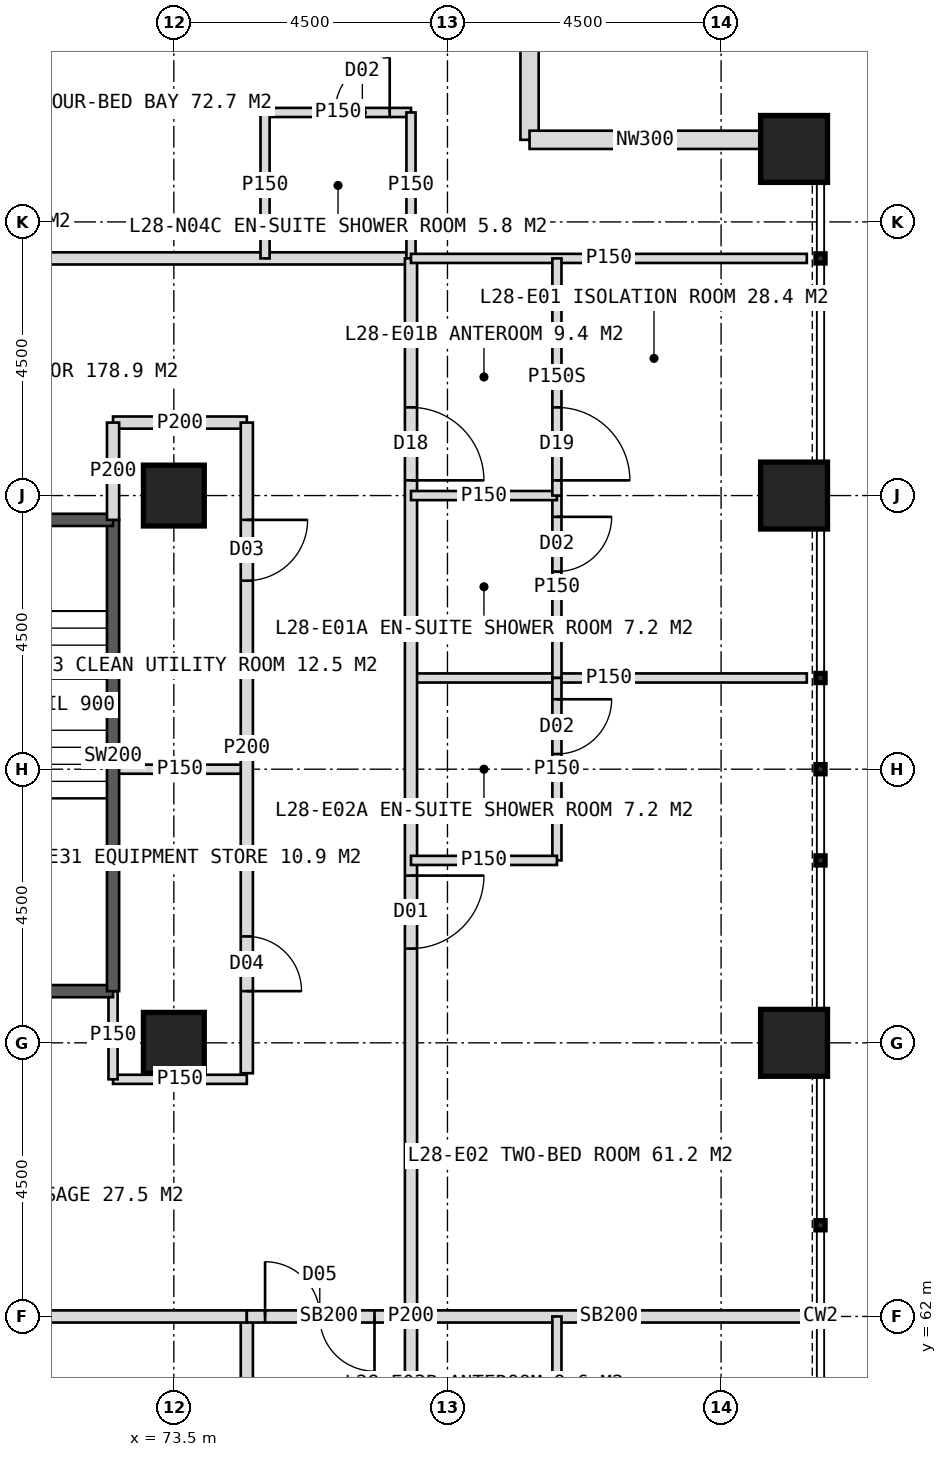
"""IFC4 building model, lengths in metres.
Left out: names, types, materials, properties, quantities, classifications, styles, units other than length and angle.
Written with IfcOpenShell. Run it as: python <this file> out.ifc"""

import sys

from ifc_helpers import new_model, si_unit, direction, frame, frame_2d, origin, origin_2d, place, context, subcontext, project, spatial, rectangle, hollow_rectangle, extrude, element, fill, save


model = new_model("IFC4")
c1 = context("Model", 3, precision=1e-05, world=origin(), true_north=direction((0.0, 1.0)))
c2 = subcontext(c1, "Body", "Model", "MODEL_VIEW")
j1 = project(units=[si_unit("LENGTHUNIT", "METRE"), si_unit("PLANEANGLEUNIT", "RADIAN")], contexts=[c1])
p1 = place(None, origin())
s1 = spatial("IfcSite", under=j1, at=p1, CompositionType="ELEMENT")
p2 = place(p1, origin())
s2 = spatial("IfcBuilding", under=s1, at=p2, CompositionType="ELEMENT")
p3 = place(p2, frame((0.0, 0.0, 120.0)))
s3 = spatial("IfcBuildingStorey", under=s2, at=p3, CompositionType="ELEMENT", Elevation=120.0)
for number, where, z_axis, x_axis in (
    (1, (73.5, 75.5, 0.0), (0.0, 0.0, 1.0), (1.0, 0.0, 0.0)),
    (2, (73.5, 66.5, 0.0), (0.0, 0.0, 1.0), (1.0, 0.0, 0.0)),
):
    element("IfcColumn", number, at=place(p3, frame(where, z_axis=z_axis, x_axis=x_axis)), inside=s3, PredefinedType="COLUMN", context=c2, shape_type="SweptSolid", body=[
        extrude(hollow_rectangle(XDim=1.0, YDim=1.0, WallThickness=0.1, at=origin_2d()), origin(), (0.0, 0.0, 1.0), 4.0),
    ])
for number, where, z_axis, x_axis in (
    (3, (83.7, 66.5, 0.0), (0.0, 0.0, 1.0), (1.0, 0.0, 0.0)),
    (4, (83.7, 75.5, 0.0), (0.0, 0.0, 1.0), (1.0, 0.0, 0.0)),
    (5, (83.7, 81.2, 0.0), (0.0, 0.0, 1.0), (1.0, 0.0, 0.0)),
):
    element("IfcColumn", number, at=place(p3, frame(where, z_axis=z_axis, x_axis=x_axis)), inside=s3, PredefinedType="COLUMN", context=c2, shape_type="SweptSolid", body=[
        extrude(hollow_rectangle(XDim=1.1, YDim=1.1, WallThickness=0.1, at=origin_2d()), origin(), (0.0, 0.0, 1.0), 4.0),
    ])
for number, where, z_axis, x_axis in (
    (6, (79.35, 85.15, 0.0), (0.0, 0.0, 1.0), (0.0, -1.0, 0.0)),
    (7, (79.35, 81.35, 0.0), (0.0, 0.0, 1.0), (1.0, 0.0, 0.0)),
):
    element("IfcWall", number, at=place(p3, frame(where, z_axis=z_axis, x_axis=x_axis)), inside=s3, PredefinedType="ELEMENTEDWALL", context=c2, shape_type="SweptSolid", body=[
        extrude(rectangle(XDim=3.8, YDim=0.3, at=frame_2d((1.9, 0.0))), origin(), (0.0, 0.0, 1.0), 4.0),
    ])
p4 = place(p3, frame((42.6, 79.4, 0.0), z_axis=(0.0, 0.0, 1.0), x_axis=(1.0, 0.0, 0.0)))
e8 = element("IfcWall", 8, at=p4, inside=s3, PredefinedType="PARTITIONING", context=c2, shape_type="SweptSolid", body=[
    extrude(rectangle(XDim=34.8, YDim=0.2, at=frame_2d((17.4, 0.0))), origin(), (0.0, 0.0, 1.0), 3.75),
])
p5 = place(p4, frame((2.45, 0.0, 0.0)))
e9 = element("IfcOpeningElement", 9, at=p5, cuts=e8, PredefinedType="OPENING", context=c2, shape_type="SweptSolid", body=[
    extrude(rectangle(XDim=1.2, YDim=2.2, at=frame_2d((0.6, 1.1))), frame((0.0, 0.11, 0.0), z_axis=(0.0, -1.0, 0.0), x_axis=(1.0, 0.0, 0.0)), (0.0, 0.0, 1.0), 0.22),
])
p6 = place(p4, frame((10.15, 0.0, 0.0)))
e10 = element("IfcOpeningElement", 10, at=p6, cuts=e8, PredefinedType="OPENING", context=c2, shape_type="SweptSolid", body=[
    extrude(rectangle(XDim=1.2, YDim=2.2, at=frame_2d((0.6, 1.1))), frame((0.0, 0.11, 0.0), z_axis=(0.0, -1.0, 0.0), x_axis=(1.0, 0.0, 0.0)), (0.0, 0.0, 1.0), 0.22),
])
p7 = place(p4, frame((19.8, 0.0, 0.0)))
e11 = element("IfcOpeningElement", 11, at=p7, cuts=e8, PredefinedType="OPENING", context=c2, shape_type="SweptSolid", body=[
    extrude(rectangle(XDim=1.2, YDim=2.2, at=frame_2d((0.6, 1.1))), frame((0.0, 0.11, 0.0), z_axis=(0.0, -1.0, 0.0), x_axis=(1.0, 0.0, 0.0)), (0.0, 0.0, 1.0), 0.22),
])
p8 = place(p4, frame((27.55, 0.0, 0.0)))
e12 = element("IfcOpeningElement", 12, at=p8, cuts=e8, PredefinedType="OPENING", context=c2, shape_type="SweptSolid", body=[
    extrude(rectangle(XDim=1.2, YDim=2.2, at=frame_2d((0.6, 1.1))), frame((0.0, 0.11, 0.0), z_axis=(0.0, -1.0, 0.0), x_axis=(1.0, 0.0, 0.0)), (0.0, 0.0, 1.0), 0.22),
])
p9 = place(p3, frame((75.0, 81.8, 0.0), z_axis=(0.0, 0.0, 1.0), x_axis=(1.0, 0.0, 0.0)))
e13 = element("IfcWall", 13, at=p9, inside=s3, PredefinedType="PARTITIONING", context=c2, shape_type="SweptSolid", body=[
    extrude(rectangle(XDim=2.4, YDim=0.15, at=frame_2d((1.2, 0.0))), origin(), (0.0, 0.0, 1.0), 3.75),
])
p10 = place(p9, frame((1.15, 0.0, 0.0)))
e14 = element("IfcOpeningElement", 14, at=p10, cuts=e13, PredefinedType="OPENING", context=c2, shape_type="SweptSolid", body=[
    extrude(rectangle(XDim=0.9, YDim=2.1, at=frame_2d((0.45, 1.05))), frame((0.0, 0.085, 0.0), z_axis=(0.0, -1.0, 0.0), x_axis=(1.0, 0.0, 0.0)), (0.0, 0.0, 1.0), 0.17),
])
for number, where, z_axis, x_axis in (
    (15, (75.0, 79.4, 0.0), (0.0, 0.0, 1.0), (0.0, 1.0, 0.0)),
    (16, (77.4, 79.4, 0.0), (0.0, 0.0, 1.0), (0.0, 1.0, 0.0)),
):
    element("IfcWall", number, at=place(p3, frame(where, z_axis=z_axis, x_axis=x_axis)), inside=s3, PredefinedType="PARTITIONING", context=c2, shape_type="SweptSolid", body=[
        extrude(rectangle(XDim=2.4, YDim=0.15, at=frame_2d((1.2, 0.0))), origin(), (0.0, 0.0, 1.0), 3.75),
    ])
p11 = place(p3, frame((72.5, 76.7, 0.0), z_axis=(0.0, 0.0, 1.0), x_axis=(1.0, 0.0, 0.0)))
e17 = element("IfcWall", 17, at=p11, inside=s3, PredefinedType="PARTITIONING", context=c2, shape_type="SweptSolid", body=[
    extrude(rectangle(XDim=2.2, YDim=0.2, at=frame_2d((1.1, 0.0))), origin(), (0.0, 0.0, 1.0), 3.75),
])
p12 = place(p3, frame((77.4, 72.5, 0.0), z_axis=(0.0, 0.0, 1.0), x_axis=(1.0, 0.0, 0.0)))
e18 = element("IfcWall", 18, at=p12, inside=s3, PredefinedType="PARTITIONING", context=c2, shape_type="SweptSolid", body=[
    extrude(rectangle(XDim=6.51, YDim=0.15, at=frame_2d((3.255, 0.0))), origin(), (0.0, 0.0, 1.0), 3.75),
])
p13 = place(p3, frame((77.4, 62.0, 0.0), z_axis=(0.0, 0.0, 1.0), x_axis=(1.0, 0.0, 0.0)))
e19 = element("IfcWall", 19, at=p13, inside=s3, PredefinedType="SOLIDWALL", context=c2, shape_type="SweptSolid", body=[
    extrude(rectangle(XDim=6.51, YDim=0.2, at=frame_2d((3.255, 0.0))), origin(), (0.0, 0.0, 1.0), 2.95),
])
p14 = place(p3, frame((77.4, 79.4, 0.0), z_axis=(0.0, 0.0, 1.0), x_axis=(0.0, -1.0, 0.0)))
e20 = element("IfcWall", 20, at=p14, inside=s3, PredefinedType="PARTITIONING", context=c2, shape_type="SweptSolid", body=[
    extrude(rectangle(XDim=34.8, YDim=0.2, at=frame_2d((17.4, 0.0))), origin(), (0.0, 0.0, 1.0), 3.75),
])
p15 = place(p14, frame((2.45, 0.0, 0.0)))
e21 = element("IfcOpeningElement", 21, at=p15, cuts=e20, PredefinedType="OPENING", context=c2, shape_type="SweptSolid", body=[
    extrude(rectangle(XDim=1.2, YDim=2.2, at=frame_2d((0.6, 1.1))), frame((0.0, 0.11, 0.0), z_axis=(0.0, -1.0, 0.0), x_axis=(1.0, 0.0, 0.0)), (0.0, 0.0, 1.0), 0.22),
])
p16 = place(p14, frame((10.15, 0.0, 0.0)))
e22 = element("IfcOpeningElement", 22, at=p16, cuts=e20, PredefinedType="OPENING", context=c2, shape_type="SweptSolid", body=[
    extrude(rectangle(XDim=1.2, YDim=2.2, at=frame_2d((0.6, 1.1))), frame((0.0, 0.11, 0.0), z_axis=(0.0, -1.0, 0.0), x_axis=(1.0, 0.0, 0.0)), (0.0, 0.0, 1.0), 0.22),
])
p17 = place(p14, frame((19.55, 0.0, 0.0)))
e23 = element("IfcOpeningElement", 23, at=p17, cuts=e20, PredefinedType="OPENING", context=c2, shape_type="SweptSolid", body=[
    extrude(rectangle(XDim=1.2, YDim=2.2, at=frame_2d((0.6, 1.1))), frame((0.0, 0.11, 0.0), z_axis=(0.0, -1.0, 0.0), x_axis=(1.0, 0.0, 0.0)), (0.0, 0.0, 1.0), 0.22),
])
p18 = place(p14, frame((26.05, 0.0, 0.0)))
e24 = element("IfcOpeningElement", 24, at=p18, cuts=e20, PredefinedType="OPENING", context=c2, shape_type="SweptSolid", body=[
    extrude(rectangle(XDim=1.2, YDim=2.2, at=frame_2d((0.6, 1.1))), frame((0.0, 0.11, 0.0), z_axis=(0.0, -1.0, 0.0), x_axis=(1.0, 0.0, 0.0)), (0.0, 0.0, 1.0), 0.22),
])
p19 = place(p3, frame((77.4, 79.4, 0.0), z_axis=(0.0, 0.0, 1.0), x_axis=(1.0, 0.0, 0.0)))
e25 = element("IfcWall", 25, at=p19, inside=s3, PredefinedType="PARTITIONING", context=c2, shape_type="SweptSolid", body=[
    extrude(rectangle(XDim=6.51, YDim=0.15, at=frame_2d((3.255, 0.0))), origin(), (0.0, 0.0, 1.0), 3.75),
])
p20 = place(p3, frame((79.8, 75.5, 0.0), z_axis=(0.0, 0.0, 1.0), x_axis=(0.0, -1.0, 0.0)))
e26 = element("IfcWall", 26, at=p20, inside=s3, PredefinedType="PARTITIONING", context=c2, shape_type="SweptSolid", body=[
    extrude(rectangle(XDim=3.0, YDim=0.15, at=frame_2d((1.5, 0.0))), origin(), (0.0, 0.0, 1.0), 3.75),
])
p21 = place(p20, frame((0.35, 0.0, 0.0)))
e27 = element("IfcOpeningElement", 27, at=p21, cuts=e26, PredefinedType="OPENING", context=c2, shape_type="SweptSolid", body=[
    extrude(rectangle(XDim=0.9, YDim=2.1, at=frame_2d((0.45, 1.05))), frame((0.0, 0.085, 0.0), z_axis=(0.0, -1.0, 0.0), x_axis=(1.0, 0.0, 0.0)), (0.0, 0.0, 1.0), 0.17),
])
p22 = place(p3, frame((77.4, 75.5, 0.0), z_axis=(0.0, 0.0, 1.0), x_axis=(1.0, 0.0, 0.0)))
e28 = element("IfcWall", 28, at=p22, inside=s3, PredefinedType="PARTITIONING", context=c2, shape_type="SweptSolid", body=[
    extrude(rectangle(XDim=2.4, YDim=0.15, at=frame_2d((1.2, 0.0))), origin(), (0.0, 0.0, 1.0), 2.95),
])
p23 = place(p3, frame((79.8, 79.4, 0.0), z_axis=(0.0, 0.0, 1.0), x_axis=(0.0, -1.0, 0.0)))
e29 = element("IfcWall", 29, at=p23, inside=s3, PredefinedType="PARTITIONING", context=c2, shape_type="SweptSolid", body=[
    extrude(rectangle(XDim=3.9, YDim=0.15, at=frame_2d((1.95, 0.0))), origin(), (0.0, 0.0, 1.0), 3.75),
])
p24 = place(p23, frame((2.45, 0.0, 0.0)))
e30 = element("IfcOpeningElement", 30, at=p24, cuts=e29, PredefinedType="OPENING", context=c2, shape_type="SweptSolid", body=[
    extrude(rectangle(XDim=1.2, YDim=2.2, at=frame_2d((0.6, 1.1))), frame((0.0, 0.085, 0.0), z_axis=(0.0, -1.0, 0.0), x_axis=(1.0, 0.0, 0.0)), (0.0, 0.0, 1.0), 0.17),
])
p25 = place(p3, frame((79.8, 72.5, 0.0), z_axis=(0.0, 0.0, 1.0), x_axis=(0.0, -1.0, 0.0)))
e31 = element("IfcWall", 31, at=p25, inside=s3, PredefinedType="PARTITIONING", context=c2, shape_type="SweptSolid", body=[
    extrude(rectangle(XDim=3.0, YDim=0.15, at=frame_2d((1.5, 0.0))), origin(), (0.0, 0.0, 1.0), 3.75),
])
p26 = place(p25, frame((0.35, 0.0, 0.0)))
e32 = element("IfcOpeningElement", 32, at=p26, cuts=e31, PredefinedType="OPENING", context=c2, shape_type="SweptSolid", body=[
    extrude(rectangle(XDim=0.9, YDim=2.1, at=frame_2d((0.45, 1.05))), frame((0.0, 0.085, 0.0), z_axis=(0.0, -1.0, 0.0), x_axis=(1.0, 0.0, 0.0)), (0.0, 0.0, 1.0), 0.17),
])
p27 = place(p3, frame((77.4, 69.5, 0.0), z_axis=(0.0, 0.0, 1.0), x_axis=(1.0, 0.0, 0.0)))
e33 = element("IfcWall", 33, at=p27, inside=s3, PredefinedType="PARTITIONING", context=c2, shape_type="SweptSolid", body=[
    extrude(rectangle(XDim=2.4, YDim=0.15, at=frame_2d((1.2, 0.0))), origin(), (0.0, 0.0, 1.0), 3.75),
])
p28 = place(p3, frame((79.8, 62.0, 0.0), z_axis=(0.0, 0.0, 1.0), x_axis=(0.0, -1.0, 0.0)))
e34 = element("IfcWall", 34, at=p28, inside=s3, PredefinedType="PARTITIONING", context=c2, shape_type="SweptSolid", body=[
    extrude(rectangle(XDim=3.6, YDim=0.15, at=frame_2d((1.8, 0.0))), origin(), (0.0, 0.0, 1.0), 3.75),
])
p29 = place(p28, frame((2.15, 0.0, 0.0)))
e35 = element("IfcOpeningElement", 35, at=p29, cuts=e34, PredefinedType="OPENING", context=c2, shape_type="SweptSolid", body=[
    extrude(rectangle(XDim=1.2, YDim=2.2, at=frame_2d((0.6, 1.1))), frame((0.0, 0.085, 0.0), z_axis=(0.0, -1.0, 0.0), x_axis=(1.0, 0.0, 0.0)), (0.0, 0.0, 1.0), 0.17),
])
p30 = place(p3, frame((72.5, 71.0, 0.0), z_axis=(0.0, 0.0, 1.0), x_axis=(1.0, 0.0, 0.0)))
e36 = element("IfcWall", 36, at=p30, inside=s3, PredefinedType="PARTITIONING", context=c2, shape_type="SweptSolid", body=[
    extrude(rectangle(XDim=2.2, YDim=0.15, at=frame_2d((1.1, 0.0))), origin(), (0.0, 0.0, 1.0), 3.75),
])
p31 = place(p3, frame((74.7, 76.7, 0.0), z_axis=(0.0, 0.0, 1.0), x_axis=(0.0, -1.0, 0.0)))
e37 = element("IfcWall", 37, at=p31, inside=s3, PredefinedType="PARTITIONING", context=c2, shape_type="SweptSolid", body=[
    extrude(rectangle(XDim=10.7, YDim=0.2, at=frame_2d((5.35, 0.0))), origin(), (0.0, 0.0, 1.0), 3.75),
])
p32 = place(p31, frame((1.6, 0.0, 0.0)))
e38 = element("IfcOpeningElement", 38, at=p32, cuts=e37, PredefinedType="OPENING", context=c2, shape_type="SweptSolid", body=[
    extrude(rectangle(XDim=1.0, YDim=2.1, at=frame_2d((0.5, 1.05))), frame((0.0, 0.11, 0.0), z_axis=(0.0, -1.0, 0.0), x_axis=(1.0, 0.0, 0.0)), (0.0, 0.0, 1.0), 0.22),
])
p33 = place(p31, frame((8.45, 0.0, 0.0)))
e39 = element("IfcOpeningElement", 39, at=p33, cuts=e37, PredefinedType="OPENING", context=c2, shape_type="SweptSolid", body=[
    extrude(rectangle(XDim=0.9, YDim=2.1, at=frame_2d((0.45, 1.05))), frame((0.0, 0.11, 0.0), z_axis=(0.0, -1.0, 0.0), x_axis=(1.0, 0.0, 0.0)), (0.0, 0.0, 1.0), 0.22),
])
p34 = place(p3, frame((74.7, 62.0, 0.0), z_axis=(0.0, 0.0, 1.0), x_axis=(0.0, -1.0, 0.0)))
e40 = element("IfcWall", 40, at=p34, inside=s3, PredefinedType="PARTITIONING", context=c2, shape_type="SweptSolid", body=[
    extrude(rectangle(XDim=14.7, YDim=0.2, at=frame_2d((7.35, 0.0))), origin(), (0.0, 0.0, 1.0), 3.75),
])
p35 = place(p34, frame((1.45, 0.0, 0.0)))
e41 = element("IfcOpeningElement", 41, at=p35, cuts=e40, PredefinedType="OPENING", context=c2, shape_type="SweptSolid", body=[
    extrude(rectangle(XDim=1.0, YDim=2.1, at=frame_2d((0.5, 1.05))), frame((0.0, 0.11, 0.0), z_axis=(0.0, -1.0, 0.0), x_axis=(1.0, 0.0, 0.0)), (0.0, 0.0, 1.0), 0.22),
])
p36 = place(p34, frame((11.35, 0.0, 0.0)))
e42 = element("IfcOpeningElement", 42, at=p36, cuts=e40, PredefinedType="OPENING", context=c2, shape_type="SweptSolid", body=[
    extrude(rectangle(XDim=1.0, YDim=2.1, at=frame_2d((0.5, 1.05))), frame((0.0, 0.11, 0.0), z_axis=(0.0, -1.0, 0.0), x_axis=(1.0, 0.0, 0.0)), (0.0, 0.0, 1.0), 0.22),
])
p37 = place(p3, frame((72.5, 65.9, 0.0), z_axis=(0.0, 0.0, 1.0), x_axis=(1.0, 0.0, 0.0)))
e43 = element("IfcWall", 43, at=p37, inside=s3, PredefinedType="PARTITIONING", context=c2, shape_type="SweptSolid", body=[
    extrude(rectangle(XDim=2.2, YDim=0.15, at=frame_2d((1.1, 0.0))), origin(), (0.0, 0.0, 1.0), 3.75),
])
p38 = place(p3, frame((69.0, 62.0, 0.0), z_axis=(0.0, 0.0, 1.0), x_axis=(1.0, 0.0, 0.0)))
e44 = element("IfcWall", 44, at=p38, inside=s3, PredefinedType="SOLIDWALL", context=c2, shape_type="SweptSolid", body=[
    extrude(rectangle(XDim=5.7, YDim=0.2, at=frame_2d((2.85, 0.0))), origin(), (0.0, 0.0, 1.0), 2.95),
])
p39 = place(p3, frame((74.7, 62.0, 0.0), z_axis=(0.0, 0.0, 1.0), x_axis=(1.0, 0.0, 0.0)))
e45 = element("IfcWall", 45, at=p39, inside=s3, PredefinedType="SOLIDWALL", context=c2, shape_type="SweptSolid", body=[
    extrude(rectangle(XDim=2.7, YDim=0.2, at=frame_2d((1.35, 0.0))), origin(), (0.0, 0.0, 1.0), 2.95),
])
p40 = place(p39, frame((0.3, 0.0, 0.0)))
e46 = element("IfcOpeningElement", 46, at=p40, cuts=e45, PredefinedType="OPENING", context=c2, shape_type="SweptSolid", body=[
    extrude(rectangle(XDim=1.8, YDim=2.2, at=frame_2d((0.9, 1.1))), frame((0.0, 0.11, 0.0), z_axis=(0.0, -1.0, 0.0), x_axis=(1.0, 0.0, 0.0)), (0.0, 0.0, 1.0), 0.22),
])
p41 = place(p3, frame((72.5, 65.9, 0.0), z_axis=(0.0, 0.0, 1.0), x_axis=(0.0, 1.0, 0.0)))
e47 = element("IfcWall", 47, at=p41, inside=s3, PredefinedType="PARTITIONING", context=c2, shape_type="SweptSolid", body=[
    extrude(rectangle(XDim=1.45, YDim=0.15, at=frame_2d((0.725, 0.0))), origin(), (0.0, 0.0, 1.0), 3.75),
])
p42 = place(p3, frame((69.0, 67.35, 0.0), z_axis=(0.0, 0.0, 1.0), x_axis=(1.0, 0.0, 0.0)))
e48 = element("IfcWall", 48, at=p42, inside=s3, PredefinedType="SOLIDWALL", context=c2, shape_type="SweptSolid", body=[
    extrude(rectangle(XDim=3.5, YDim=0.2, at=frame_2d((1.75, 0.0))), origin(), (0.0, 0.0, 1.0), 3.75),
])
p43 = place(p3, frame((72.5, 67.35, 0.0), z_axis=(0.0, 0.0, 1.0), x_axis=(0.0, 1.0, 0.0)))
e49 = element("IfcWall", 49, at=p43, inside=s3, PredefinedType="SOLIDWALL", context=c2, shape_type="SweptSolid", body=[
    extrude(rectangle(XDim=7.75, YDim=0.2, at=frame_2d((3.875, 0.0))), origin(), (0.0, 0.0, 1.0), 3.75),
])
p44 = place(p3, frame((69.0, 75.1, 0.0), z_axis=(0.0, 0.0, 1.0), x_axis=(1.0, 0.0, 0.0)))
e50 = element("IfcWall", 50, at=p44, inside=s3, PredefinedType="SOLIDWALL", context=c2, shape_type="SweptSolid", body=[
    extrude(rectangle(XDim=3.5, YDim=0.2, at=frame_2d((1.75, 0.0))), origin(), (0.0, 0.0, 1.0), 3.75),
])
p45 = place(p44, frame((1.15, 0.0, 0.0)))
e51 = element("IfcOpeningElement", 51, at=p45, cuts=e50, PredefinedType="OPENING", context=c2, shape_type="SweptSolid", body=[
    extrude(rectangle(XDim=1.2, YDim=2.1, at=frame_2d((0.6, 1.05))), frame((0.0, 0.11, 0.0), z_axis=(0.0, -1.0, 0.0), x_axis=(1.0, 0.0, 0.0)), (0.0, 0.0, 1.0), 0.22),
])
p46 = place(p3, frame((72.5, 75.1, 0.0), z_axis=(0.0, 0.0, 1.0), x_axis=(0.0, 1.0, 0.0)))
e52 = element("IfcWall", 52, at=p46, inside=s3, PredefinedType="PARTITIONING", context=c2, shape_type="SweptSolid", body=[
    extrude(rectangle(XDim=1.6, YDim=0.2, at=frame_2d((0.8, 0.0))), origin(), (0.0, 0.0, 1.0), 3.75),
])
p47 = place(p10, origin())
e53 = element("IfcDoor", 53, at=p47, inside=s3, OperationType="SINGLE_SWING_RIGHT", PredefinedType="DOOR", context=c2, shape_type="SweptSolid", body=[
    extrude(rectangle(XDim=0.9, YDim=2.1, at=frame_2d((0.45, 1.05))), frame((0.0, 0.025, 0.0), z_axis=(0.0, -1.0, 0.0), x_axis=(1.0, 0.0, 0.0)), (0.0, 0.0, 1.0), 0.05),
])
fill(e14, e53)
p48 = place(p32, origin())
e54 = element("IfcDoor", 54, at=p48, inside=s3, OperationType="SINGLE_SWING_LEFT", PredefinedType="DOOR", context=c2, shape_type="SweptSolid", body=[
    extrude(rectangle(XDim=1.0, YDim=2.1, at=frame_2d((0.5, 1.05))), frame((0.0, 0.025, 0.0), z_axis=(0.0, -1.0, 0.0), x_axis=(1.0, 0.0, 0.0)), (0.0, 0.0, 1.0), 0.05),
])
fill(e38, e54)
p49 = place(p24, origin())
e55 = element("IfcDoor", 55, at=p49, inside=s3, OperationType="SINGLE_SWING_RIGHT", PredefinedType="DOOR", context=c2, shape_type="SweptSolid", body=[
    extrude(rectangle(XDim=1.2, YDim=2.2, at=frame_2d((0.6, 1.1))), frame((0.0, 0.025, 0.0), z_axis=(0.0, -1.0, 0.0), x_axis=(1.0, 0.0, 0.0)), (0.0, 0.0, 1.0), 0.05),
])
fill(e30, e55)
p50 = place(p15, origin())
e56 = element("IfcDoor", 56, at=p50, inside=s3, OperationType="SINGLE_SWING_RIGHT", PredefinedType="DOOR", context=c2, shape_type="SweptSolid", body=[
    extrude(rectangle(XDim=1.2, YDim=2.2, at=frame_2d((0.6, 1.1))), frame((0.0, 0.025, 0.0), z_axis=(0.0, -1.0, 0.0), x_axis=(1.0, 0.0, 0.0)), (0.0, 0.0, 1.0), 0.05),
])
fill(e21, e56)
p51 = place(p21, origin())
e57 = element("IfcDoor", 57, at=p51, inside=s3, OperationType="SINGLE_SWING_LEFT", PredefinedType="DOOR", context=c2, shape_type="SweptSolid", body=[
    extrude(rectangle(XDim=0.9, YDim=2.1, at=frame_2d((0.45, 1.05))), frame((0.0, 0.025, 0.0), z_axis=(0.0, -1.0, 0.0), x_axis=(1.0, 0.0, 0.0)), (0.0, 0.0, 1.0), 0.05),
])
fill(e27, e57)
p52 = place(p16, origin())
e58 = element("IfcDoor", 58, at=p52, inside=s3, OperationType="SINGLE_SWING_LEFT", PredefinedType="DOOR", context=c2, shape_type="SweptSolid", body=[
    extrude(rectangle(XDim=1.2, YDim=2.2, at=frame_2d((0.6, 1.1))), frame((0.0, 0.025, 0.0), z_axis=(0.0, -1.0, 0.0), x_axis=(1.0, 0.0, 0.0)), (0.0, 0.0, 1.0), 0.05),
])
fill(e22, e58)
p53 = place(p26, origin())
e59 = element("IfcDoor", 59, at=p53, inside=s3, OperationType="SINGLE_SWING_LEFT", PredefinedType="DOOR", context=c2, shape_type="SweptSolid", body=[
    extrude(rectangle(XDim=0.9, YDim=2.1, at=frame_2d((0.45, 1.05))), frame((0.0, 0.025, 0.0), z_axis=(0.0, -1.0, 0.0), x_axis=(1.0, 0.0, 0.0)), (0.0, 0.0, 1.0), 0.05),
])
fill(e32, e59)
p54 = place(p33, origin())
e60 = element("IfcDoor", 60, at=p54, inside=s3, OperationType="SINGLE_SWING_RIGHT", PredefinedType="DOOR", context=c2, shape_type="SweptSolid", body=[
    extrude(rectangle(XDim=0.9, YDim=2.1, at=frame_2d((0.45, 1.05))), frame((0.0, 0.025, 0.0), z_axis=(0.0, -1.0, 0.0), x_axis=(1.0, 0.0, 0.0)), (0.0, 0.0, 1.0), 0.05),
])
fill(e39, e60)
p55 = place(p40, origin())
e61 = element("IfcDoor", 61, at=p55, inside=s3, OperationType="DOUBLE_DOOR_DOUBLE_SWING", PredefinedType="DOOR", context=c2, shape_type="SweptSolid", body=[
    extrude(rectangle(XDim=1.8, YDim=2.2, at=frame_2d((0.9, 1.1))), frame((0.0, 0.025, 0.0), z_axis=(0.0, -1.0, 0.0), x_axis=(1.0, 0.0, 0.0)), (0.0, 0.0, 1.0), 0.05),
])
fill(e46, e61)
save(model, sys.argv[1])
